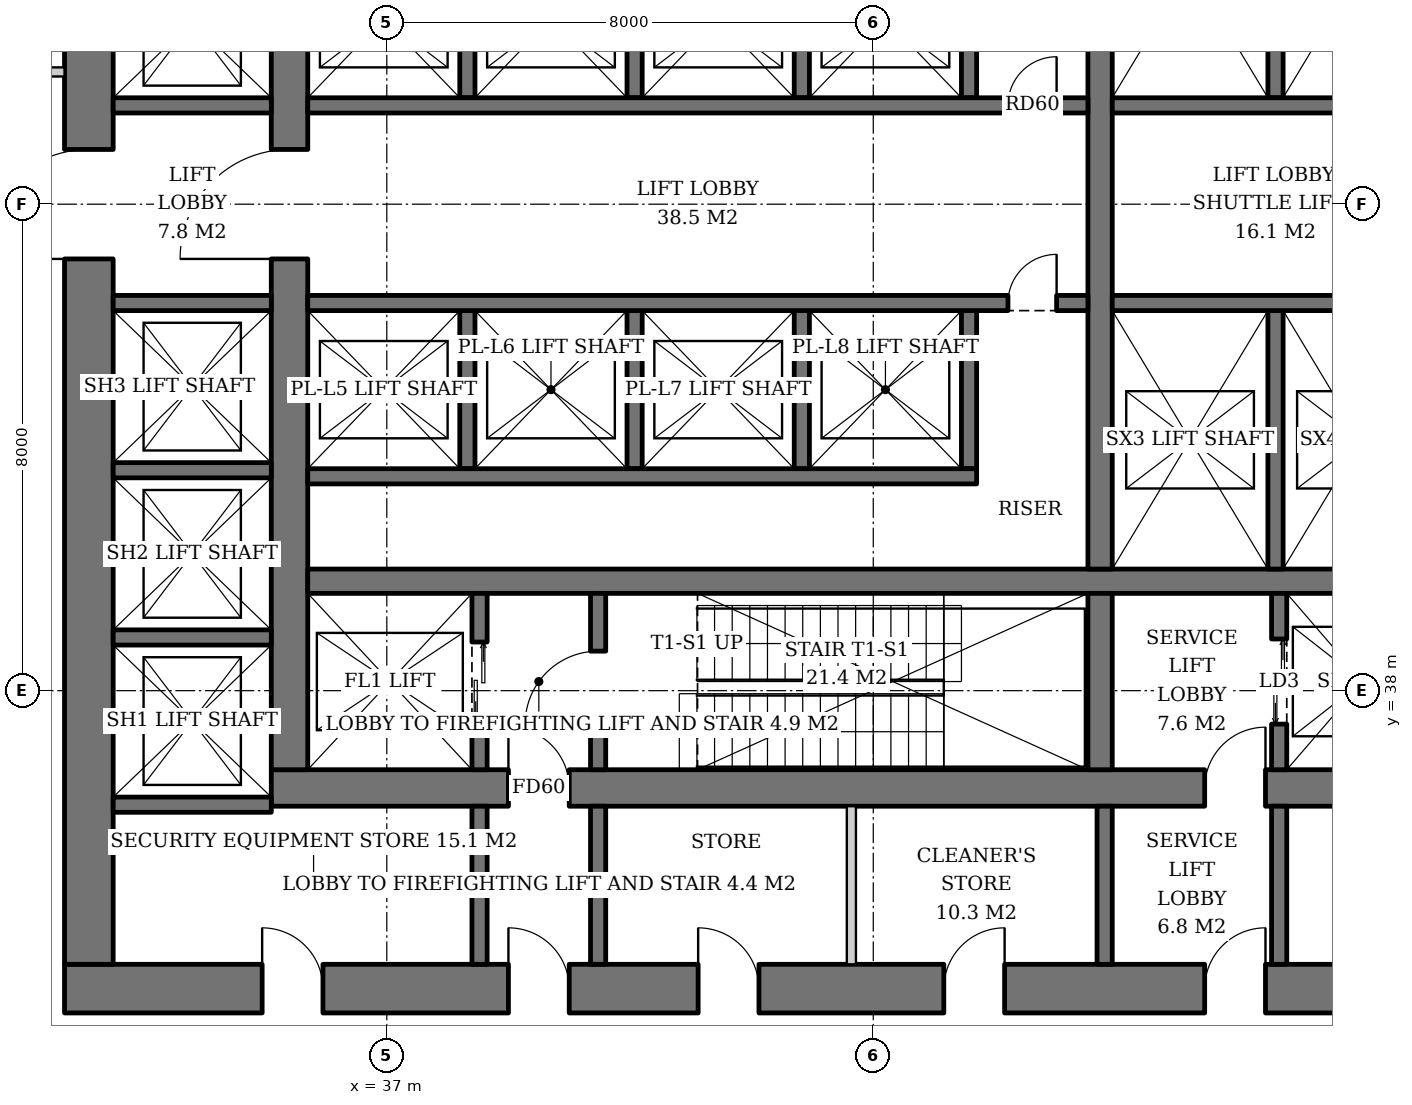
"""IFC4 building model, lengths in metres.
Left out: names, types, materials, properties, quantities, classifications, styles, units other than length and angle.
Written with IfcOpenShell. Run it as: python <this file> out.ifc"""

import sys

from ifc_helpers import new_model, si_unit, direction, frame, frame_2d, origin, place, context, subcontext, project, spatial, rectangle, extrude, element, fill, save


model = new_model("IFC4")
c1 = context("Model", 3, precision=1e-05, world=origin(), true_north=direction((0.0, 1.0)))
c2 = subcontext(c1, "Body", "Model", "MODEL_VIEW")
j1 = project(units=[si_unit("LENGTHUNIT", "METRE"), si_unit("PLANEANGLEUNIT", "RADIAN")], contexts=[c1])
p1 = place(None, origin())
s1 = spatial("IfcSite", under=j1, at=p1, CompositionType="ELEMENT")
p2 = place(p1, origin())
s2 = spatial("IfcBuilding", under=s1, at=p2, CompositionType="ELEMENT")
p3 = place(p2, frame((0.0, 0.0, 16.0)))
s3 = spatial("IfcBuildingStorey", under=s2, at=p3, CompositionType="ELEMENT", Elevation=16.0)
p4 = place(p3, frame((35.1, 36.4, 0.0), z_axis=(0.0, 0.0, 1.0), x_axis=(1.0, 0.0, 0.0)))
e1 = element("IfcWall", 1, at=p4, inside=s3, PredefinedType="SHEAR", context=c2, shape_type="SweptSolid", body=[
    extrude(rectangle(XDim=19.8, YDim=0.6, at=frame_2d((9.9, 0.0))), origin(), (0.0, 0.0, 1.0), 5.0),
])
p5 = place(p4, frame((3.9, 0.0, 0.0)))
e2 = element("IfcOpeningElement", 2, at=p5, cuts=e1, PredefinedType="OPENING", context=c2, shape_type="SweptSolid", body=[
    extrude(rectangle(XDim=1.0, YDim=2.1, at=frame_2d((0.5, 1.05))), frame((0.0, 0.31, 0.0), z_axis=(0.0, -1.0, 0.0), x_axis=(1.0, 0.0, 0.0)), (0.0, 0.0, 1.0), 0.62),
])
p6 = place(p4, frame((15.35, 0.0, 0.0)))
e3 = element("IfcOpeningElement", 3, at=p6, cuts=e1, PredefinedType="OPENING", context=c2, shape_type="SweptSolid", body=[
    extrude(rectangle(XDim=1.0, YDim=2.1, at=frame_2d((0.5, 1.05))), frame((0.0, 0.31, 0.0), z_axis=(0.0, -1.0, 0.0), x_axis=(1.0, 0.0, 0.0)), (0.0, 0.0, 1.0), 0.62),
])
p7 = place(p3, frame((35.4, 36.7, 0.0), z_axis=(0.0, 0.0, 1.0), x_axis=(0.0, 1.0, 0.0)))
e4 = element("IfcWall", 4, at=p7, inside=s3, PredefinedType="SHEAR", context=c2, shape_type="SweptSolid", body=[
    extrude(rectangle(XDim=18.6, YDim=0.6, at=frame_2d((9.3, 0.0))), origin(), (0.0, 0.0, 1.0), 5.0),
])
p8 = place(p7, frame((8.4, 0.0, 0.0)))
e5 = element("IfcOpeningElement", 5, at=p8, cuts=e4, PredefinedType="OPENING", context=c2, shape_type="SweptSolid", body=[
    extrude(rectangle(XDim=1.8, YDim=2.4, at=frame_2d((0.9, 1.2))), frame((0.0, 0.31, 0.0), z_axis=(0.0, -1.0, 0.0), x_axis=(1.0, 0.0, 0.0)), (0.0, 0.0, 1.0), 0.62),
])
p9 = place(p3, frame((31.7, 33.1, 0.0), z_axis=(0.0, 0.0, 1.0), x_axis=(1.0, 0.0, 0.0)))
e6 = element("IfcWall", 6, at=p9, inside=s3, PredefinedType="SHEAR", context=c2, shape_type="SweptSolid", body=[
    extrude(rectangle(XDim=26.6, YDim=0.8, at=frame_2d((13.3, 0.0))), origin(), (0.0, 0.0, 1.0), 5.0),
])
p10 = place(p9, frame((7.3, 0.0, 0.0)))
e7 = element("IfcOpeningElement", 7, at=p10, cuts=e6, PredefinedType="OPENING", context=c2, shape_type="SweptSolid", body=[
    extrude(rectangle(XDim=1.0, YDim=2.1, at=frame_2d((0.5, 1.05))), frame((0.0, 0.41, 0.0), z_axis=(0.0, -1.0, 0.0), x_axis=(1.0, 0.0, 0.0)), (0.0, 0.0, 1.0), 0.82),
])
p11 = place(p9, frame((18.75, 0.0, 0.0)))
e8 = element("IfcOpeningElement", 8, at=p11, cuts=e6, PredefinedType="OPENING", context=c2, shape_type="SweptSolid", body=[
    extrude(rectangle(XDim=1.0, YDim=2.1, at=frame_2d((0.5, 1.05))), frame((0.0, 0.41, 0.0), z_axis=(0.0, -1.0, 0.0), x_axis=(1.0, 0.0, 0.0)), (0.0, 0.0, 1.0), 0.82),
])
p12 = place(p9, frame((3.25, 0.0, 0.0)))
e9 = element("IfcOpeningElement", 9, at=p12, cuts=e6, PredefinedType="OPENING", context=c2, shape_type="SweptSolid", body=[
    extrude(rectangle(XDim=1.0, YDim=2.1, at=frame_2d((0.5, 1.05))), frame((0.0, 0.41, 0.0), z_axis=(0.0, -1.0, 0.0), x_axis=(1.0, 0.0, 0.0)), (0.0, 0.0, 1.0), 0.82),
])
p13 = place(p9, frame((10.42, 0.0, 0.0)))
e10 = element("IfcOpeningElement", 10, at=p13, cuts=e6, PredefinedType="OPENING", context=c2, shape_type="SweptSolid", body=[
    extrude(rectangle(XDim=1.0, YDim=2.1, at=frame_2d((0.5, 1.05))), frame((0.0, 0.41, 0.0), z_axis=(0.0, -1.0, 0.0), x_axis=(1.0, 0.0, 0.0)), (0.0, 0.0, 1.0), 0.82),
])
p14 = place(p9, frame((14.46, 0.0, 0.0)))
e11 = element("IfcOpeningElement", 11, at=p14, cuts=e6, PredefinedType="OPENING", context=c2, shape_type="SweptSolid", body=[
    extrude(rectangle(XDim=1.0, YDim=2.1, at=frame_2d((0.5, 1.05))), frame((0.0, 0.41, 0.0), z_axis=(0.0, -1.0, 0.0), x_axis=(1.0, 0.0, 0.0)), (0.0, 0.0, 1.0), 0.82),
])
p15 = place(p9, frame((22.45, 0.0, 0.0)))
e12 = element("IfcOpeningElement", 12, at=p15, cuts=e6, PredefinedType="OPENING", context=c2, shape_type="SweptSolid", body=[
    extrude(rectangle(XDim=1.0, YDim=2.1, at=frame_2d((0.5, 1.05))), frame((0.0, 0.41, 0.0), z_axis=(0.0, -1.0, 0.0), x_axis=(1.0, 0.0, 0.0)), (0.0, 0.0, 1.0), 0.82),
])
p16 = place(p3, frame((32.1, 33.5, 0.0), z_axis=(0.0, 0.0, 1.0), x_axis=(0.0, 1.0, 0.0)))
e13 = element("IfcWall", 13, at=p16, inside=s3, PredefinedType="SHEAR", context=c2, shape_type="SweptSolid", body=[
    extrude(rectangle(XDim=25.0, YDim=0.8, at=frame_2d((12.5, 0.0))), origin(), (0.0, 0.0, 1.0), 5.0),
])
p17 = place(p16, frame((11.6, 0.0, 0.0)))
e14 = element("IfcOpeningElement", 14, at=p17, cuts=e13, PredefinedType="OPENING", context=c2, shape_type="SweptSolid", body=[
    extrude(rectangle(XDim=1.8, YDim=2.4, at=frame_2d((0.9, 1.2))), frame((0.0, 0.41, 0.0), z_axis=(0.0, -1.0, 0.0), x_axis=(1.0, 0.0, 0.0)), (0.0, 0.0, 1.0), 0.82),
])
p18 = place(p3, frame((35.7, 39.8, 0.0), z_axis=(0.0, 0.0, 1.0), x_axis=(1.0, 0.0, 0.0)))
e15 = element("IfcWall", 15, at=p18, inside=s3, PredefinedType="SHEAR", context=c2, shape_type="SweptSolid", body=[
    extrude(rectangle(XDim=18.6, YDim=0.4, at=frame_2d((9.3, 0.0))), origin(), (0.0, 0.0, 1.0), 5.0),
])
p19 = place(p3, frame((48.73, 36.7, 0.0), z_axis=(0.0, 0.0, 1.0), x_axis=(0.0, 1.0, 0.0)))
e16 = element("IfcWall", 16, at=p19, inside=s3, PredefinedType="SHEAR", context=c2, shape_type="SweptSolid", body=[
    extrude(rectangle(XDim=2.9, YDim=0.4, at=frame_2d((1.45, 0.0))), origin(), (0.0, 0.0, 1.0), 5.0),
])
p20 = place(p3, frame((48.73, 40.0, 0.0), z_axis=(0.0, 0.0, 1.0), x_axis=(0.0, 1.0, 0.0)))
e17 = element("IfcWall", 17, at=p20, inside=s3, PredefinedType="SHEAR", context=c2, shape_type="SweptSolid", body=[
    extrude(rectangle(XDim=12.0, YDim=0.4, at=frame_2d((6.0, 0.0))), origin(), (0.0, 0.0, 1.0), 5.0),
])
p21 = place(p3, frame((38.525, 36.7, 0.0), z_axis=(0.0, 0.0, 1.0), x_axis=(0.0, 1.0, 0.0)))
e18 = element("IfcWall", 18, at=p21, inside=s3, PredefinedType="SHEAR", context=c2, shape_type="SweptSolid", body=[
    extrude(rectangle(XDim=2.9, YDim=0.25, at=frame_2d((1.45, 0.0))), origin(), (0.0, 0.0, 1.0), 5.0),
])
p22 = place(p21, frame((0.8, 0.0, 0.0)))
e19 = element("IfcOpeningElement", 19, at=p22, cuts=e18, PredefinedType="OPENING", context=c2, shape_type="SweptSolid", body=[
    extrude(rectangle(XDim=1.3, YDim=2.2, at=frame_2d((0.65, 1.1))), frame((0.0, 0.135, 0.0), z_axis=(0.0, -1.0, 0.0), x_axis=(1.0, 0.0, 0.0)), (0.0, 0.0, 1.0), 0.27),
])
p23 = place(p3, frame((40.475, 36.7, 0.0), z_axis=(0.0, 0.0, 1.0), x_axis=(0.0, 1.0, 0.0)))
e20 = element("IfcWall", 20, at=p23, inside=s3, PredefinedType="SHEAR", context=c2, shape_type="SweptSolid", body=[
    extrude(rectangle(XDim=2.9, YDim=0.25, at=frame_2d((1.45, 0.0))), origin(), (0.0, 0.0, 1.0), 5.0),
])
p24 = place(p23, frame((0.75, 0.0, 0.0)))
e21 = element("IfcOpeningElement", 21, at=p24, cuts=e20, PredefinedType="OPENING", context=c2, shape_type="SweptSolid", body=[
    extrude(rectangle(XDim=1.2, YDim=2.1, at=frame_2d((0.6, 1.05))), frame((0.0, 0.135, 0.0), z_axis=(0.0, -1.0, 0.0), x_axis=(1.0, 0.0, 0.0)), (0.0, 0.0, 1.0), 0.27),
])
p25 = place(p3, frame((51.675, 36.7, 0.0), z_axis=(0.0, 0.0, 1.0), x_axis=(0.0, 1.0, 0.0)))
e22 = element("IfcWall", 22, at=p25, inside=s3, PredefinedType="SHEAR", context=c2, shape_type="SweptSolid", body=[
    extrude(rectangle(XDim=2.9, YDim=0.25, at=frame_2d((1.45, 0.0))), origin(), (0.0, 0.0, 1.0), 5.0),
])
p26 = place(p25, frame((0.75, 0.0, 0.0)))
e23 = element("IfcOpeningElement", 23, at=p26, cuts=e22, PredefinedType="OPENING", context=c2, shape_type="SweptSolid", body=[
    extrude(rectangle(XDim=1.4, YDim=2.4, at=frame_2d((0.7, 1.2))), frame((0.0, 0.135, 0.0), z_axis=(0.0, -1.0, 0.0), x_axis=(1.0, 0.0, 0.0)), (0.0, 0.0, 1.0), 0.27),
])
for number, where, z_axis, x_axis in (
    (24, (38.325, 47.75, 0.0), (0.0, 0.0, 1.0), (0.0, 1.0, 0.0)),
    (25, (41.075, 47.75, 0.0), (0.0, 0.0, 1.0), (0.0, 1.0, 0.0)),
    (26, (43.825, 47.75, 0.0), (0.0, 0.0, 1.0), (0.0, 1.0, 0.0)),
    (27, (46.575, 47.75, 0.0), (0.0, 0.0, 1.0), (0.0, 1.0, 0.0)),
):
    element("IfcWall", number, at=place(p3, frame(where, z_axis=z_axis, x_axis=x_axis)), inside=s3, PredefinedType="SHEAR", context=c2, shape_type="SweptSolid", body=[
        extrude(rectangle(XDim=2.6, YDim=0.25, at=frame_2d((1.3, 0.0))), origin(), (0.0, 0.0, 1.0), 5.0),
    ])
p27 = place(p3, frame((35.7, 47.625, 0.0), z_axis=(0.0, 0.0, 1.0), x_axis=(1.0, 0.0, 0.0)))
e28 = element("IfcWall", 28, at=p27, inside=s3, PredefinedType="SHEAR", context=c2, shape_type="SweptSolid", body=[
    extrude(rectangle(XDim=12.83, YDim=0.25, at=frame_2d((6.415, 0.0))), origin(), (0.0, 0.0, 1.0), 5.0),
])
p28 = place(p27, frame((11.515, 0.0, 0.0)))
e29 = element("IfcOpeningElement", 29, at=p28, cuts=e28, PredefinedType="OPENING", context=c2, shape_type="SweptSolid", body=[
    extrude(rectangle(XDim=0.8, YDim=2.0, at=frame_2d((0.4, 1.0))), frame((0.0, 0.135, 0.0), z_axis=(0.0, -1.0, 0.0), x_axis=(1.0, 0.0, 0.0)), (0.0, 0.0, 1.0), 0.27),
])
for number, where, z_axis, x_axis in (
    (30, (38.325, 44.25, 0.0), (0.0, 0.0, 1.0), (0.0, -1.0, 0.0)),
    (31, (41.075, 44.25, 0.0), (0.0, 0.0, 1.0), (0.0, -1.0, 0.0)),
    (32, (43.825, 44.25, 0.0), (0.0, 0.0, 1.0), (0.0, -1.0, 0.0)),
    (33, (46.575, 44.25, 0.0), (0.0, 0.0, 1.0), (0.0, -1.0, 0.0)),
):
    element("IfcWall", number, at=place(p3, frame(where, z_axis=z_axis, x_axis=x_axis)), inside=s3, PredefinedType="SHEAR", context=c2, shape_type="SweptSolid", body=[
        extrude(rectangle(XDim=2.6, YDim=0.25, at=frame_2d((1.3, 0.0))), origin(), (0.0, 0.0, 1.0), 5.0),
    ])
p29 = place(p3, frame((35.7, 41.525, 0.0), z_axis=(0.0, 0.0, 1.0), x_axis=(1.0, 0.0, 0.0)))
e34 = element("IfcWall", 34, at=p29, inside=s3, PredefinedType="SHEAR", context=c2, shape_type="SweptSolid", body=[
    extrude(rectangle(XDim=11.0, YDim=0.25, at=frame_2d((5.5, 0.0))), origin(), (0.0, 0.0, 1.0), 5.0),
])
p30 = place(p3, frame((35.7, 44.375, 0.0), z_axis=(0.0, 0.0, 1.0), x_axis=(1.0, 0.0, 0.0)))
e35 = element("IfcWall", 35, at=p30, inside=s3, PredefinedType="SHEAR", context=c2, shape_type="SweptSolid", body=[
    extrude(rectangle(XDim=12.83, YDim=0.25, at=frame_2d((6.415, 0.0))), origin(), (0.0, 0.0, 1.0), 5.0),
])
p31 = place(p30, frame((11.515, 0.0, 0.0)))
e36 = element("IfcOpeningElement", 36, at=p31, cuts=e35, PredefinedType="OPENING", context=c2, shape_type="SweptSolid", body=[
    extrude(rectangle(XDim=0.8, YDim=2.0, at=frame_2d((0.4, 1.0))), frame((0.0, 0.135, 0.0), z_axis=(0.0, -1.0, 0.0), x_axis=(1.0, 0.0, 0.0)), (0.0, 0.0, 1.0), 0.27),
])
p32 = place(p3, frame((51.615, 47.75, 0.0), z_axis=(0.0, 0.0, 1.0), x_axis=(0.0, 1.0, 0.0)))
e37 = element("IfcWall", 37, at=p32, inside=s3, PredefinedType="SHEAR", context=c2, shape_type="SweptSolid", body=[
    extrude(rectangle(XDim=4.25, YDim=0.25, at=frame_2d((2.125, 0.0))), origin(), (0.0, 0.0, 1.0), 5.0),
])
p33 = place(p3, frame((48.93, 47.625, 0.0), z_axis=(0.0, 0.0, 1.0), x_axis=(1.0, 0.0, 0.0)))
e38 = element("IfcWall", 38, at=p33, inside=s3, PredefinedType="SHEAR", context=c2, shape_type="SweptSolid", body=[
    extrude(rectangle(XDim=5.37, YDim=0.25, at=frame_2d((2.685, 0.0))), origin(), (0.0, 0.0, 1.0), 5.0),
])
p34 = place(p3, frame((51.615, 44.25, 0.0), z_axis=(0.0, 0.0, 1.0), x_axis=(0.0, -1.0, 0.0)))
e39 = element("IfcWall", 39, at=p34, inside=s3, PredefinedType="SHEAR", context=c2, shape_type="SweptSolid", body=[
    extrude(rectangle(XDim=4.25, YDim=0.25, at=frame_2d((2.125, 0.0))), origin(), (0.0, 0.0, 1.0), 5.0),
])
p35 = place(p3, frame((48.93, 44.375, 0.0), z_axis=(0.0, 0.0, 1.0), x_axis=(1.0, 0.0, 0.0)))
e40 = element("IfcWall", 40, at=p35, inside=s3, PredefinedType="SHEAR", context=c2, shape_type="SweptSolid", body=[
    extrude(rectangle(XDim=5.37, YDim=0.25, at=frame_2d((2.685, 0.0))), origin(), (0.0, 0.0, 1.0), 5.0),
])
for number, where, z_axis, x_axis in (
    (41, (32.5, 36.125, 0.0), (0.0, 0.0, 1.0), (1.0, 0.0, 0.0)),
    (42, (32.5, 38.875, 0.0), (0.0, 0.0, 1.0), (1.0, 0.0, 0.0)),
    (43, (32.5, 41.625, 0.0), (0.0, 0.0, 1.0), (1.0, 0.0, 0.0)),
    (44, (32.5, 44.375, 0.0), (0.0, 0.0, 1.0), (1.0, 0.0, 0.0)),
    (45, (32.5, 47.625, 0.0), (0.0, 0.0, 1.0), (1.0, 0.0, 0.0)),
):
    element("IfcWall", number, at=place(p3, frame(where, z_axis=z_axis, x_axis=x_axis)), inside=s3, PredefinedType="SHEAR", context=c2, shape_type="SweptSolid", body=[
        extrude(rectangle(XDim=2.6, YDim=0.25, at=frame_2d((1.3, 0.0))), origin(), (0.0, 0.0, 1.0), 5.0),
    ])
for number, where, z_axis, x_axis in (
    (46, (38.525, 33.5, 0.0), (0.0, 0.0, 1.0), (0.0, 1.0, 0.0)),
    (47, (40.475, 33.5, 0.0), (0.0, 0.0, 1.0), (0.0, 1.0, 0.0)),
    (48, (48.805, 33.5, 0.0), (0.0, 0.0, 1.0), (0.0, 1.0, 0.0)),
    (49, (51.675, 33.5, 0.0), (0.0, 0.0, 1.0), (0.0, 1.0, 0.0)),
):
    element("IfcWall", number, at=place(p3, frame(where, z_axis=z_axis, x_axis=x_axis)), inside=s3, PredefinedType="SOLIDWALL", context=c2, shape_type="SweptSolid", body=[
        extrude(rectangle(XDim=2.6, YDim=0.25, at=frame_2d((1.3, 0.0))), origin(), (0.0, 0.0, 1.0), 4.7),
    ])
p36 = place(p3, frame((44.64, 33.5, 0.0), z_axis=(0.0, 0.0, 1.0), x_axis=(0.0, 1.0, 0.0)))
e50 = element("IfcWall", 50, at=p36, inside=s3, PredefinedType="SOLIDWALL", context=c2, shape_type="SweptSolid", body=[
    extrude(rectangle(XDim=2.6, YDim=0.15, at=frame_2d((1.3, 0.0))), origin(), (0.0, 0.0, 1.0), 4.7),
])
p37 = place(p3, frame((29.175, 48.175, 0.0), z_axis=(0.0, 0.0, 1.0), x_axis=(1.0, 0.0, 0.0)))
e51 = element("IfcWall", 51, at=p37, inside=s3, PredefinedType="PARTITIONING", context=c2, shape_type="SweptSolid", body=[
    extrude(rectangle(XDim=2.525, YDim=0.15, at=frame_2d((1.262, 0.0))), origin(), (0.0, 0.0, 1.0), 4.7),
])
p38 = place(p22, origin())
e52 = element("IfcDoor", 52, at=p38, inside=s3, OperationType="DOUBLE_DOOR_SLIDING", PredefinedType="DOOR", context=c2, shape_type="SweptSolid", body=[
    extrude(rectangle(XDim=1.3, YDim=2.2, at=frame_2d((0.65, 1.1))), frame((0.0, 0.025, 0.0), z_axis=(0.0, -1.0, 0.0), x_axis=(1.0, 0.0, 0.0)), (0.0, 0.0, 1.0), 0.05),
])
fill(e19, e52)
p39 = place(p24, origin())
e53 = element("IfcDoor", 53, at=p39, inside=s3, OperationType="SINGLE_SWING_LEFT", PredefinedType="DOOR", context=c2, shape_type="SweptSolid", body=[
    extrude(rectangle(XDim=1.2, YDim=2.1, at=frame_2d((0.6, 1.05))), frame((0.0, 0.025, 0.0), z_axis=(0.0, -1.0, 0.0), x_axis=(1.0, 0.0, 0.0)), (0.0, 0.0, 1.0), 0.05),
])
fill(e21, e53)
p40 = place(p26, origin())
e54 = element("IfcDoor", 54, at=p40, inside=s3, OperationType="DOUBLE_DOOR_SLIDING", PredefinedType="DOOR", context=c2, shape_type="SweptSolid", body=[
    extrude(rectangle(XDim=1.4, YDim=2.4, at=frame_2d((0.7, 1.2))), frame((0.0, 0.025, 0.0), z_axis=(0.0, -1.0, 0.0), x_axis=(1.0, 0.0, 0.0)), (0.0, 0.0, 1.0), 0.05),
])
fill(e23, e54)
p41 = place(p28, origin())
e55 = element("IfcDoor", 55, at=p41, inside=s3, OperationType="SINGLE_SWING_RIGHT", PredefinedType="DOOR", context=c2, shape_type="SweptSolid", body=[
    extrude(rectangle(XDim=0.8, YDim=2.0, at=frame_2d((0.4, 1.0))), frame((0.0, 0.025, 0.0), z_axis=(0.0, -1.0, 0.0), x_axis=(1.0, 0.0, 0.0)), (0.0, 0.0, 1.0), 0.05),
])
fill(e29, e55)
p42 = place(p31, origin())
e56 = element("IfcDoor", 56, at=p42, inside=s3, OperationType="SINGLE_SWING_RIGHT", PredefinedType="DOOR", context=c2, shape_type="SweptSolid", body=[
    extrude(rectangle(XDim=0.8, YDim=2.0, at=frame_2d((0.4, 1.0))), frame((0.0, 0.025, 0.0), z_axis=(0.0, -1.0, 0.0), x_axis=(1.0, 0.0, 0.0)), (0.0, 0.0, 1.0), 0.05),
])
fill(e36, e56)
p43 = place(p5, origin())
e57 = element("IfcDoor", 57, at=p43, inside=s3, OperationType="SINGLE_SWING_LEFT", PredefinedType="DOOR", context=c2, shape_type="SweptSolid", body=[
    extrude(rectangle(XDim=1.0, YDim=2.1, at=frame_2d((0.5, 1.05))), frame((0.0, 0.025, 0.0), z_axis=(0.0, -1.0, 0.0), x_axis=(1.0, 0.0, 0.0)), (0.0, 0.0, 1.0), 0.05),
])
fill(e2, e57)
p44 = place(p8, origin())
e58 = element("IfcDoor", 58, at=p44, inside=s3, OperationType="DOUBLE_DOOR_SINGLE_SWING", PredefinedType="DOOR", context=c2, shape_type="SweptSolid", body=[
    extrude(rectangle(XDim=1.8, YDim=2.4, at=frame_2d((0.9, 1.2))), frame((0.0, 0.025, 0.0), z_axis=(0.0, -1.0, 0.0), x_axis=(1.0, 0.0, 0.0)), (0.0, 0.0, 1.0), 0.05),
])
fill(e5, e58)
p45 = place(p6, origin())
e59 = element("IfcDoor", 59, at=p45, inside=s3, OperationType="SINGLE_SWING_RIGHT", PredefinedType="DOOR", context=c2, shape_type="SweptSolid", body=[
    extrude(rectangle(XDim=1.0, YDim=2.1, at=frame_2d((0.5, 1.05))), frame((0.0, 0.025, 0.0), z_axis=(0.0, -1.0, 0.0), x_axis=(1.0, 0.0, 0.0)), (0.0, 0.0, 1.0), 0.05),
])
fill(e3, e59)
p46 = place(p17, origin())
e60 = element("IfcDoor", 60, at=p46, inside=s3, OperationType="DOUBLE_DOOR_SINGLE_SWING", PredefinedType="DOOR", context=c2, shape_type="SweptSolid", body=[
    extrude(rectangle(XDim=1.8, YDim=2.4, at=frame_2d((0.9, 1.2))), frame((0.0, 0.025, 0.0), z_axis=(0.0, -1.0, 0.0), x_axis=(1.0, 0.0, 0.0)), (0.0, 0.0, 1.0), 0.05),
])
fill(e14, e60)
p47 = place(p10, origin())
e61 = element("IfcDoor", 61, at=p47, inside=s3, OperationType="SINGLE_SWING_LEFT", PredefinedType="DOOR", context=c2, shape_type="SweptSolid", body=[
    extrude(rectangle(XDim=1.0, YDim=2.1, at=frame_2d((0.5, 1.05))), frame((0.0, 0.025, 0.0), z_axis=(0.0, -1.0, 0.0), x_axis=(1.0, 0.0, 0.0)), (0.0, 0.0, 1.0), 0.05),
])
fill(e7, e61)
p48 = place(p11, origin())
e62 = element("IfcDoor", 62, at=p48, inside=s3, OperationType="SINGLE_SWING_RIGHT", PredefinedType="DOOR", context=c2, shape_type="SweptSolid", body=[
    extrude(rectangle(XDim=1.0, YDim=2.1, at=frame_2d((0.5, 1.05))), frame((0.0, 0.025, 0.0), z_axis=(0.0, -1.0, 0.0), x_axis=(1.0, 0.0, 0.0)), (0.0, 0.0, 1.0), 0.05),
])
fill(e8, e62)
p49 = place(p12, origin())
e63 = element("IfcDoor", 63, at=p49, inside=s3, OperationType="SINGLE_SWING_LEFT", PredefinedType="DOOR", context=c2, shape_type="SweptSolid", body=[
    extrude(rectangle(XDim=1.0, YDim=2.1, at=frame_2d((0.5, 1.05))), frame((0.0, 0.39, 0.0), z_axis=(0.0, -1.0, 0.0), x_axis=(1.0, 0.0, 0.0)), (0.0, 0.0, 1.0), 0.05),
])
fill(e9, e63)
p50 = place(p13, origin())
e64 = element("IfcDoor", 64, at=p50, inside=s3, OperationType="SINGLE_SWING_LEFT", PredefinedType="DOOR", context=c2, shape_type="SweptSolid", body=[
    extrude(rectangle(XDim=1.0, YDim=2.1, at=frame_2d((0.5, 1.05))), frame((0.0, 0.39, 0.0), z_axis=(0.0, -1.0, 0.0), x_axis=(1.0, 0.0, 0.0)), (0.0, 0.0, 1.0), 0.05),
])
fill(e10, e64)
p51 = place(p14, origin())
e65 = element("IfcDoor", 65, at=p51, inside=s3, OperationType="SINGLE_SWING_RIGHT", PredefinedType="DOOR", context=c2, shape_type="SweptSolid", body=[
    extrude(rectangle(XDim=1.0, YDim=2.1, at=frame_2d((0.5, 1.05))), frame((0.0, 0.39, 0.0), z_axis=(0.0, -1.0, 0.0), x_axis=(1.0, 0.0, 0.0)), (0.0, 0.0, 1.0), 0.05),
])
fill(e11, e65)
save(model, sys.argv[1])
